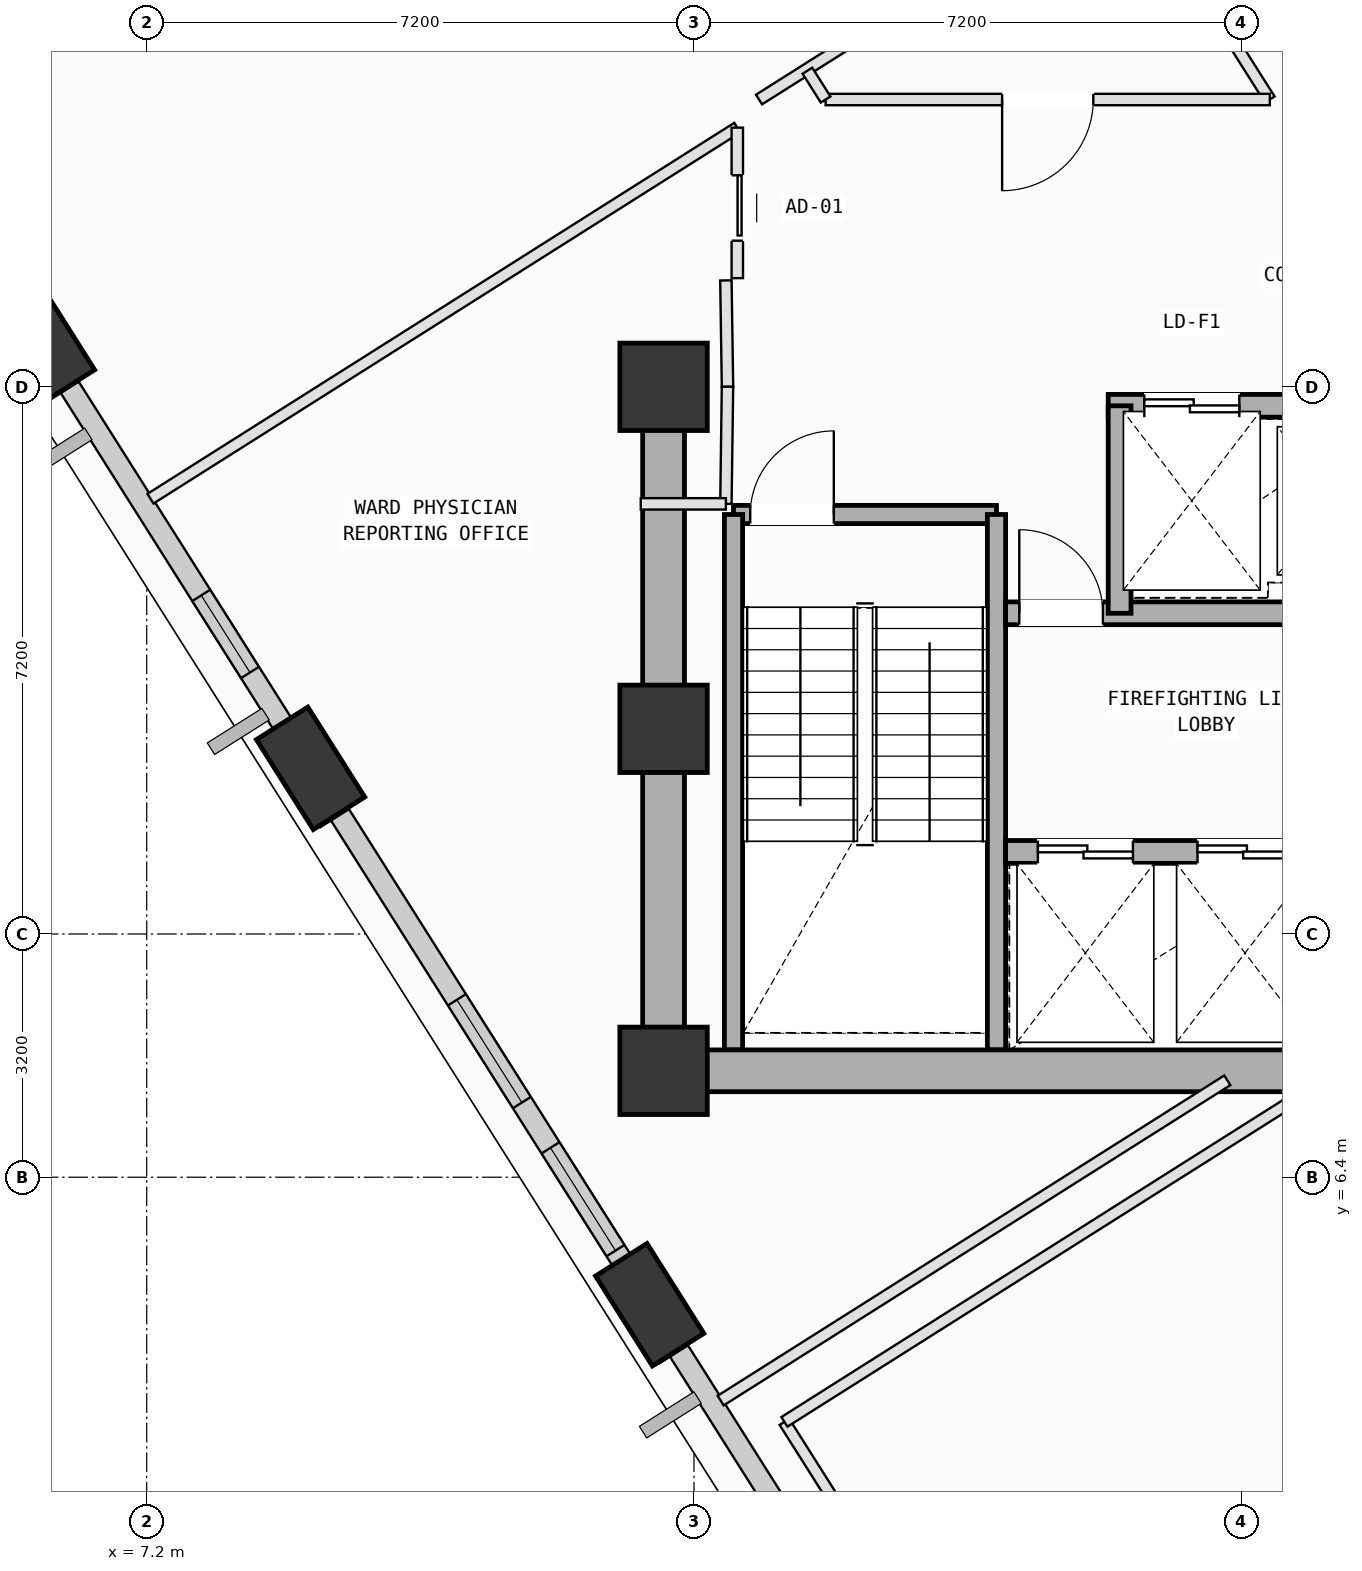
"""IFC4 building model, lengths in metres.
Left out: names, types, materials, properties, quantities, classifications, styles, units other than length and angle.
Written with IfcOpenShell. Run it as: python <this file> out.ifc"""

import sys

from ifc_helpers import new_model, si_unit, direction, frame, frame_2d, origin, origin_2d, place, context, subcontext, project, spatial, rectangle, extrude, element, fill, save


model = new_model("IFC4")
c1 = context("Model", 3, precision=1e-05, world=origin(), true_north=direction((0.0, 1.0)))
c2 = subcontext(c1, "Body", "Model", "MODEL_VIEW")
j1 = project(units=[si_unit("LENGTHUNIT", "METRE"), si_unit("PLANEANGLEUNIT", "RADIAN")], contexts=[c1])
p1 = place(None, origin())
s1 = spatial("IfcSite", under=j1, at=p1, CompositionType="ELEMENT")
p2 = place(p1, origin())
s2 = spatial("IfcBuilding", under=s1, at=p2, CompositionType="ELEMENT")
p3 = place(p2, frame((0.0, 0.0, 161.8)))
s3 = spatial("IfcBuildingStorey", under=s2, at=p3, CompositionType="ELEMENT", Elevation=161.8)
for number, where, z_axis, x_axis in (
    (1, (14.0, 7.8, 0.0), (0.0, 0.0, 1.0), (1.0, 0.0, 0.0)),
    (2, (14.0, 12.3, 0.0), (0.0, 0.0, 1.0), (1.0, 0.0, 0.0)),
    (3, (14.0, 16.8, 0.0), (0.0, 0.0, 1.0), (1.0, 0.0, 0.0)),
):
    element("IfcColumn", number, at=place(p3, frame(where, z_axis=z_axis, x_axis=x_axis)), inside=s3, PredefinedType="COLUMN", context=c2, shape_type="SweptSolid", body=[
        extrude(rectangle(XDim=1.15, YDim=1.15, at=origin_2d()), origin(), (0.0, 0.0, 1.0), 4.0),
    ])
p4 = place(p3, frame((5.802, 17.401, 0.002), z_axis=(0.031361950908, -0.114164780676, 0.992966681661), x_axis=(-0.737594296746, 0.667787272041, 0.100074036129)))
e4 = element("IfcColumn", 4, at=p4, inside=s3, PredefinedType="COLUMN", context=c2, shape_type="SweptSolid", body=[
    extrude(rectangle(XDim=1.4, YDim=0.8, at=origin_2d()), origin(), (0.0, 0.0, 1.0), 4.025),
])
p5 = place(p3, frame((9.356, 11.78, 0.002), z_axis=(0.054445838239, -0.099362137343, 0.993560675732), x_axis=(-0.872179225903, 0.479720383709, 0.095769261028)))
e5 = element("IfcColumn", 5, at=p5, inside=s3, PredefinedType="COLUMN", context=c2, shape_type="SweptSolid", body=[
    extrude(rectangle(XDim=1.4, YDim=0.8, at=origin_2d()), origin(), (0.0, 0.0, 1.0), 4.022),
])
p6 = place(p3, frame((13.818, 4.722, 0.002), z_axis=(0.083311503867, -0.080763009212, 0.99324545288), x_axis=(-0.974731905422, 0.200695041451, 0.098077586066)))
e6 = element("IfcColumn", 6, at=p6, inside=s3, PredefinedType="COLUMN", context=c2, shape_type="SweptSolid", body=[
    extrude(rectangle(XDim=1.4, YDim=0.8, at=origin_2d()), origin(), (0.0, 0.0, 1.0), 4.023),
])
p7 = place(p3, frame((9.212, 12.007, 0.0), z_axis=(0.0, 0.0, 1.0), x_axis=(-0.534348210739, 0.845264449554, 0.0)))
e7 = element("IfcWall", 7, at=p7, inside=s3, PredefinedType="SOLIDWALL", context=c2, shape_type="SweptSolid", body=[
    extrude(rectangle(XDim=5.662, YDim=0.28, at=frame_2d((2.831, 0.0))), origin(), (0.0, 0.0, 1.0), 3.165),
])
p8 = place(p7, frame((1.223, 0.0, 0.75)))
e8 = element("IfcOpeningElement", 8, at=p8, cuts=e7, PredefinedType="OPENING", context=c2, shape_type="SweptSolid", body=[
    extrude(rectangle(XDim=1.2, YDim=1.75, at=frame_2d((0.6, 0.875))), frame((0.0, 0.15, 0.0), z_axis=(0.0, -1.0, 0.0), x_axis=(1.0, 0.0, 0.0)), (0.0, 0.0, 1.0), 0.3),
])
p9 = place(p3, frame((13.675, 4.947, 0.0), z_axis=(0.0, 0.0, 1.0), x_axis=(-0.534359841205, 0.845257097047, 0.0)))
e9 = element("IfcWall", 9, at=p9, inside=s3, PredefinedType="SOLIDWALL", context=c2, shape_type="SweptSolid", body=[
    extrude(rectangle(XDim=7.36, YDim=0.28, at=frame_2d((3.68, 0.0))), origin(), (0.0, 0.0, 1.0), 3.165),
])
p10 = place(p9, frame((2.881, 0.0, 0.75)))
e10 = element("IfcOpeningElement", 10, at=p10, cuts=e9, PredefinedType="OPENING", context=c2, shape_type="SweptSolid", body=[
    extrude(rectangle(XDim=1.6, YDim=1.95, at=frame_2d((0.8, 0.975))), frame((0.0, 0.15, 0.0), z_axis=(0.0, -1.0, 0.0), x_axis=(1.0, 0.0, 0.0)), (0.0, 0.0, 1.0), 0.3),
])
p11 = place(p9, frame((0.576, 0.0, 0.75)))
e11 = element("IfcOpeningElement", 11, at=p11, cuts=e9, PredefinedType="OPENING", context=c2, shape_type="SweptSolid", body=[
    extrude(rectangle(XDim=1.6, YDim=1.95, at=frame_2d((0.8, 0.975))), frame((0.0, 0.15, 0.0), z_axis=(0.0, -1.0, 0.0), x_axis=(1.0, 0.0, 0.0)), (0.0, 0.0, 1.0), 0.3),
])
p12 = place(p3, frame((17.528, -1.147, 0.0), z_axis=(0.0, 0.0, 1.0), x_axis=(-0.534339793989, 0.845269770287, 0.0)))
e12 = element("IfcWall", 12, at=p12, inside=s3, PredefinedType="SOLIDWALL", context=c2, shape_type="SweptSolid", body=[
    extrude(rectangle(XDim=6.223, YDim=0.28, at=frame_2d((3.112, 0.0))), origin(), (0.0, 0.0, 1.0), 3.165),
])
p13 = place(p12, frame((1.588, 0.0, 0.75)))
e13 = element("IfcOpeningElement", 13, at=p13, cuts=e12, PredefinedType="OPENING", context=c2, shape_type="SweptSolid", body=[
    extrude(rectangle(XDim=2.0, YDim=1.95, at=frame_2d((1.0, 0.975))), frame((0.0, 0.15, 0.0), z_axis=(0.0, -1.0, 0.0), x_axis=(1.0, 0.0, 0.0)), (0.0, 0.0, 1.0), 0.3),
])
p14 = place(p3, frame((14.92, 15.12, 0.0), z_axis=(0.0, 0.0, 1.0), x_axis=(1.0, 0.0, 0.0)))
e14 = element("IfcWall", 14, at=p14, inside=s3, PredefinedType="SOLIDWALL", context=c2, shape_type="SweptSolid", body=[
    extrude(rectangle(XDim=3.46, YDim=0.24, at=frame_2d((1.73, 0.0))), origin(), (0.0, 0.0, 1.0), 3.78),
])
p15 = place(p14, frame((0.22, 0.0, 0.0)))
e15 = element("IfcOpeningElement", 15, at=p15, cuts=e14, PredefinedType="OPENING", context=c2, shape_type="SweptSolid", body=[
    extrude(rectangle(XDim=1.1, YDim=2.15, at=frame_2d((0.55, 1.075))), frame((0.0, 0.13, 0.0), z_axis=(0.0, -1.0, 0.0), x_axis=(1.0, 0.0, 0.0)), (0.0, 0.0, 1.0), 0.26),
])
for number, where, z_axis, x_axis in (
    (16, (18.38, 15.12, 0.0), (0.0, 0.0, 1.0), (0.0, -1.0, 0.0)),
    (17, (14.92, 8.075, 0.0), (0.0, 0.0, 1.0), (0.0, 1.0, 0.0)),
):
    element("IfcWall", number, at=place(p3, frame(where, z_axis=z_axis, x_axis=x_axis)), inside=s3, PredefinedType="SOLIDWALL", context=c2, shape_type="SweptSolid", body=[
        extrude(rectangle(XDim=7.045, YDim=0.24, at=frame_2d((3.522, 0.0))), origin(), (0.0, 0.0, 1.0), 3.78),
    ])
p16 = place(p3, frame((14.0, 7.8, 0.0), z_axis=(0.0, 0.0, 1.0), x_axis=(1.0, 0.0, 0.0)))
e18 = element("IfcWall", 18, at=p16, inside=s3, PredefinedType="SHEAR", context=c2, shape_type="SweptSolid", body=[
    extrude(rectangle(XDim=10.8, YDim=0.55, at=frame_2d((5.4, 0.0))), origin(), (0.0, 0.0, 1.0), 3.78),
])
p17 = place(p3, frame((14.0, 16.8, 0.0), z_axis=(0.0, 0.0, 1.0), x_axis=(0.0, -1.0, 0.0)))
e19 = element("IfcWall", 19, at=p17, inside=s3, PredefinedType="SHEAR", context=c2, shape_type="SweptSolid", body=[
    extrude(rectangle(XDim=9.0, YDim=0.55, at=frame_2d((4.5, 0.0))), origin(), (0.0, 0.0, 1.0), 3.78),
])
p18 = place(p3, frame((19.85, 16.55, 0.0), z_axis=(0.0, 0.0, 1.0), x_axis=(1.0, 0.0, 0.0)))
e20 = element("IfcWall", 20, at=p18, inside=s3, PredefinedType="SOLIDWALL", context=c2, shape_type="SweptSolid", body=[
    extrude(rectangle(XDim=4.375, YDim=0.3, at=frame_2d((2.188, 0.0))), origin(), (0.0, 0.0, 1.0), 3.78),
])
p19 = place(p18, frame((0.475, 0.0, 0.0)))
e21 = element("IfcOpeningElement", 21, at=p19, cuts=e20, PredefinedType="OPENING", context=c2, shape_type="SweptSolid", body=[
    extrude(rectangle(XDim=1.25, YDim=2.18, at=frame_2d((0.625, 1.09))), frame((0.0, 0.16, 0.0), z_axis=(0.0, -1.0, 0.0), x_axis=(1.0, 0.0, 0.0)), (0.0, 0.0, 1.0), 0.32),
])
p20 = place(p18, frame((2.49, 0.0, 0.0)))
e22 = element("IfcOpeningElement", 22, at=p20, cuts=e20, PredefinedType="OPENING", context=c2, shape_type="SweptSolid", body=[
    extrude(rectangle(XDim=1.02, YDim=2.12, at=frame_2d((0.51, 1.06))), frame((0.0, 0.16, 0.0), z_axis=(0.0, -1.0, 0.0), x_axis=(1.0, 0.0, 0.0)), (0.0, 0.0, 1.0), 0.32),
])
p21 = place(p3, frame((18.5, 10.68, 0.0), z_axis=(0.0, 0.0, 1.0), x_axis=(1.0, 0.0, 0.0)))
e23 = element("IfcWall", 23, at=p21, inside=s3, PredefinedType="SOLIDWALL", context=c2, shape_type="SweptSolid", body=[
    extrude(rectangle(XDim=5.3, YDim=0.3, at=frame_2d((2.65, 0.0))), origin(), (0.0, 0.0, 1.0), 3.78),
])
p22 = place(p21, frame((4.22, 0.0, 0.0)))
e24 = element("IfcOpeningElement", 24, at=p22, cuts=e23, PredefinedType="OPENING", context=c2, shape_type="SweptSolid", body=[
    extrude(rectangle(XDim=0.86, YDim=2.06, at=frame_2d((0.43, 1.03))), frame((0.0, 0.16, 0.0), z_axis=(0.0, -1.0, 0.0), x_axis=(1.0, 0.0, 0.0)), (0.0, 0.0, 1.0), 0.32),
])
p23 = place(p21, frame((0.425, 0.0, 0.0)))
e25 = element("IfcOpeningElement", 25, at=p23, cuts=e23, PredefinedType="OPENING", context=c2, shape_type="SweptSolid", body=[
    extrude(rectangle(XDim=1.25, YDim=2.18, at=frame_2d((0.625, 1.09))), frame((0.0, 0.16, 0.0), z_axis=(0.0, -1.0, 0.0), x_axis=(1.0, 0.0, 0.0)), (0.0, 0.0, 1.0), 0.32),
])
p24 = place(p21, frame((2.525, 0.0, 0.0)))
e26 = element("IfcOpeningElement", 26, at=p24, cuts=e23, PredefinedType="OPENING", context=c2, shape_type="SweptSolid", body=[
    extrude(rectangle(XDim=1.25, YDim=2.18, at=frame_2d((0.625, 1.09))), frame((0.0, 0.16, 0.0), z_axis=(0.0, -1.0, 0.0), x_axis=(1.0, 0.0, 0.0)), (0.0, 0.0, 1.0), 0.32),
])
p25 = place(p3, frame((18.5, 13.82, 0.0), z_axis=(0.0, 0.0, 1.0), x_axis=(1.0, 0.0, 0.0)))
e27 = element("IfcWall", 27, at=p25, inside=s3, PredefinedType="SOLIDWALL", context=c2, shape_type="SweptSolid", body=[
    extrude(rectangle(XDim=5.3, YDim=0.3, at=frame_2d((2.65, 0.0))), origin(), (0.0, 0.0, 1.0), 3.78),
])
p26 = place(p25, frame((0.18, 0.0, 0.0)))
e28 = element("IfcOpeningElement", 28, at=p26, cuts=e27, PredefinedType="OPENING", context=c2, shape_type="SweptSolid", body=[
    extrude(rectangle(XDim=1.1, YDim=2.15, at=frame_2d((0.55, 1.075))), frame((0.0, 0.16, 0.0), z_axis=(0.0, -1.0, 0.0), x_axis=(1.0, 0.0, 0.0)), (0.0, 0.0, 1.0), 0.32),
])
p27 = place(p3, frame((20.0, 13.82, 0.0), z_axis=(0.0, 0.0, 1.0), x_axis=(0.0, 1.0, 0.0)))
e29 = element("IfcWall", 29, at=p27, inside=s3, PredefinedType="SOLIDWALL", context=c2, shape_type="SweptSolid", body=[
    extrude(rectangle(XDim=2.73, YDim=0.3, at=frame_2d((1.365, 0.0))), origin(), (0.0, 0.0, 1.0), 3.78),
])
p28 = place(p3, frame((21.501, -6.169, 0.0), z_axis=(0.0, 0.0, 1.0), x_axis=(-0.534362466771, 0.845255437194, 0.0)))
e30 = element("IfcWall", 30, at=p28, inside=s3, PredefinedType="PARTITIONING", context=c2, shape_type="SweptSolid", body=[
    extrude(rectangle(XDim=11.062, YDim=0.15, at=frame_2d((5.531, 0.0))), origin(), (0.0, 0.0, 1.0), 3.165),
])
p29 = place(p3, frame((15.59, 3.181, 0.0), z_axis=(0.0, 0.0, 1.0), x_axis=(0.845257053827, 0.53435990957, 0.0)))
e31 = element("IfcWall", 31, at=p29, inside=s3, PredefinedType="PARTITIONING", context=c2, shape_type="SweptSolid", body=[
    extrude(rectangle(XDim=8.41, YDim=0.15, at=frame_2d((4.205, 0.0))), origin(), (0.0, 0.0, 1.0), 3.78),
])
p30 = place(p3, frame((14.82, 18.2, 0.0), z_axis=(0.0, 0.0, 1.0), x_axis=(0.01499656939, -0.99988754513, 0.0)))
e32 = element("IfcWall", 32, at=p30, inside=s3, PredefinedType="PARTITIONING", context=c2, shape_type="SweptSolid", body=[
    extrude(rectangle(XDim=1.4, YDim=0.15, at=frame_2d((0.7, 0.0))), origin(), (0.0, 0.0, 1.0), 3.78),
])
p31 = place(p3, frame((14.841, 16.8, 0.0), z_axis=(0.0, 0.0, 1.0), x_axis=(-0.01363221443, -0.999907077048, 0.0)))
e33 = element("IfcWall", 33, at=p31, inside=s3, PredefinedType="PARTITIONING", context=c2, shape_type="SweptSolid", body=[
    extrude(rectangle(XDim=1.54, YDim=0.15, at=frame_2d((0.77, 0.0))), origin(), (0.0, 0.0, 1.0), 3.78),
])
p32 = place(p3, frame((14.82, 15.26, 0.0), z_axis=(0.0, 0.0, 1.0), x_axis=(-1.0, 0.0, 0.0)))
e34 = element("IfcWall", 34, at=p32, inside=s3, PredefinedType="PARTITIONING", context=c2, shape_type="SweptSolid", body=[
    extrude(rectangle(XDim=1.12, YDim=0.15, at=frame_2d((0.56, 0.0))), origin(), (0.0, 0.0, 1.0), 3.78),
])
p33 = place(p3, frame((21.417, 7.675, 0.0), z_axis=(0.0, 0.0, 1.0), x_axis=(-0.845260047402, -0.534355174268, 0.0)))
e35 = element("IfcWall", 35, at=p33, inside=s3, PredefinedType="PARTITIONING", context=c2, shape_type="SweptSolid", body=[
    extrude(rectangle(XDim=7.886, YDim=0.15, at=frame_2d((3.943, 0.0))), origin(), (0.0, 0.0, 1.0), 3.78),
])
p34 = place(p3, frame((14.008, 3.991, 0.0), z_axis=(0.0, 0.0, 1.0), x_axis=(-0.534710294064, 0.845035443885, 0.0)))
e36 = element("IfcWall", 36, at=p34, inside=s3, PredefinedType="PARTITIONING", context=c2, shape_type="SweptSolid", body=[
    extrude(rectangle(XDim=0.986, YDim=0.15, at=frame_2d((0.493, 0.0))), origin(), (0.0, 0.0, 1.0), 3.165),
])
p35 = place(p3, frame((9.548, 11.046, 0.0), z_axis=(0.0, 0.0, 1.0), x_axis=(-0.534483823757, 0.845178704264, 0.0)))
e37 = element("IfcWall", 37, at=p35, inside=s3, PredefinedType="PARTITIONING", context=c2, shape_type="SweptSolid", body=[
    extrude(rectangle(XDim=0.992, YDim=0.15, at=frame_2d((0.496, 0.0))), origin(), (0.0, 0.0, 1.0), 3.165),
])
p36 = place(p3, frame((7.249, 15.328, 0.0), z_axis=(0.0, 0.0, 1.0), x_axis=(0.845207448996, 0.534438367038, 0.0)))
e38 = element("IfcWall", 38, at=p36, inside=s3, PredefinedType="PARTITIONING", context=c2, shape_type="SweptSolid", body=[
    extrude(rectangle(XDim=9.135, YDim=0.15, at=frame_2d((4.567, 0.0))), origin(), (0.0, 0.0, 1.0), 3.78),
])
p37 = place(p3, frame((14.97, 20.21, 0.0), z_axis=(0.0, 0.0, 1.0), x_axis=(0.0, -1.0, 0.0)))
e39 = element("IfcWall", 39, at=p37, inside=s3, PredefinedType="PARTITIONING", context=c2, shape_type="SweptSolid", body=[
    extrude(rectangle(XDim=1.98, YDim=0.15, at=frame_2d((0.99, 0.0))), origin(), (0.0, 0.0, 1.0), 3.78),
])
p38 = place(p37, frame((0.627, 0.0, 0.0)))
e40 = element("IfcOpeningElement", 40, at=p38, cuts=e39, PredefinedType="OPENING", context=c2, shape_type="SweptSolid", body=[
    extrude(rectangle(XDim=0.86, YDim=2.06, at=frame_2d((0.43, 1.03))), frame((0.0, 0.085, 0.0), z_axis=(0.0, -1.0, 0.0), x_axis=(1.0, 0.0, 0.0)), (0.0, 0.0, 1.0), 0.17),
])
p39 = place(p3, frame((5.992, 16.67, 0.0), z_axis=(0.0, 0.0, 1.0), x_axis=(-0.534011681052, 0.845477098744, 0.0)))
e41 = element("IfcWall", 41, at=p39, inside=s3, PredefinedType="PARTITIONING", context=c2, shape_type="SweptSolid", body=[
    extrude(rectangle(XDim=0.983, YDim=0.15, at=frame_2d((0.491, 0.0))), origin(), (0.0, 0.0, 1.0), 3.165),
])
p40 = place(p3, frame((19.998, 23.578, 0.0), z_axis=(0.0, 0.0, 1.0), x_axis=(-0.845256150615, -0.534361338279, 0.0)))
e42 = element("IfcWall", 42, at=p40, inside=s3, PredefinedType="PARTITIONING", context=c2, shape_type="SweptSolid", body=[
    extrude(rectangle(XDim=5.61, YDim=0.15, at=frame_2d((2.805, 0.0))), origin(), (0.0, 0.0, 1.0), 3.78),
])
p41 = place(p3, frame((20.057, 23.615, 0.0), z_axis=(0.0, 0.0, 1.0), x_axis=(0.534471261003, -0.845186648712, 0.0)))
e43 = element("IfcWall", 43, at=p41, inside=s3, PredefinedType="PARTITIONING", context=c2, shape_type="SweptSolid", body=[
    extrude(rectangle(XDim=3.591, YDim=0.15, at=frame_2d((1.795, 0.0))), origin(), (0.0, 0.0, 1.0), 3.78),
])
p42 = place(p3, frame((21.976, 20.58, 0.0), z_axis=(0.0, 0.0, 1.0), x_axis=(-1.0, 0.0, 0.0)))
e44 = element("IfcWall", 44, at=p42, inside=s3, PredefinedType="PARTITIONING", context=c2, shape_type="SweptSolid", body=[
    extrude(rectangle(XDim=5.844, YDim=0.15, at=frame_2d((2.922, 0.0))), origin(), (0.0, 0.0, 1.0), 3.78),
])
p43 = place(p42, frame((2.322, 0.0, 0.0)))
e45 = element("IfcOpeningElement", 45, at=p43, cuts=e44, PredefinedType="OPENING", context=c2, shape_type="SweptSolid", body=[
    extrude(rectangle(XDim=1.2, YDim=2.15, at=frame_2d((0.6, 1.075))), frame((0.0, 0.085, 0.0), z_axis=(0.0, -1.0, 0.0), x_axis=(1.0, 0.0, 0.0)), (0.0, 0.0, 1.0), 0.17),
])
p44 = place(p3, frame((16.132, 20.58, 0.0), z_axis=(0.0, 0.0, 1.0), x_axis=(-0.53352132423, 0.845786614101, 0.0)))
e46 = element("IfcWall", 46, at=p44, inside=s3, PredefinedType="PARTITIONING", context=c2, shape_type="SweptSolid", body=[
    extrude(rectangle(XDim=0.448, YDim=0.15, at=frame_2d((0.224, 0.0))), origin(), (0.0, 0.0, 1.0), 3.78),
])
p45 = place(p8, origin())
e47 = element("IfcWindow", 47, at=p45, inside=s3, PartitioningType="SINGLE_PANEL", PredefinedType="WINDOW", context=c2, shape_type="SweptSolid", body=[
    extrude(rectangle(XDim=1.2, YDim=1.75, at=frame_2d((0.6, 0.875))), frame((0.0, 0.03, 0.0), z_axis=(0.0, -1.0, 0.0), x_axis=(1.0, 0.0, 0.0)), (0.0, 0.0, 1.0), 0.06),
])
fill(e8, e47)
p46 = place(p10, origin())
e48 = element("IfcWindow", 48, at=p46, inside=s3, PartitioningType="SINGLE_PANEL", PredefinedType="WINDOW", context=c2, shape_type="SweptSolid", body=[
    extrude(rectangle(XDim=1.6, YDim=1.95, at=frame_2d((0.8, 0.975))), frame((0.0, 0.03, 0.0), z_axis=(0.0, -1.0, 0.0), x_axis=(1.0, 0.0, 0.0)), (0.0, 0.0, 1.0), 0.06),
])
fill(e10, e48)
p47 = place(p11, origin())
e49 = element("IfcWindow", 49, at=p47, inside=s3, PartitioningType="SINGLE_PANEL", PredefinedType="WINDOW", context=c2, shape_type="SweptSolid", body=[
    extrude(rectangle(XDim=1.6, YDim=1.95, at=frame_2d((0.8, 0.975))), frame((0.0, 0.03, 0.0), z_axis=(0.0, -1.0, 0.0), x_axis=(1.0, 0.0, 0.0)), (0.0, 0.0, 1.0), 0.06),
])
fill(e11, e49)
p48 = place(p15, origin())
e50 = element("IfcDoor", 50, at=p48, inside=s3, OperationType="SINGLE_SWING_RIGHT", PredefinedType="DOOR", context=c2, shape_type="SweptSolid", body=[
    extrude(rectangle(XDim=1.1, YDim=2.15, at=frame_2d((0.55, 1.075))), frame((0.0, 0.025, 0.0), z_axis=(0.0, -1.0, 0.0), x_axis=(1.0, 0.0, 0.0)), (0.0, 0.0, 1.0), 0.05),
])
fill(e15, e50)
p49 = place(p26, origin())
e51 = element("IfcDoor", 51, at=p49, inside=s3, OperationType="SINGLE_SWING_LEFT", PredefinedType="DOOR", context=c2, shape_type="SweptSolid", body=[
    extrude(rectangle(XDim=1.1, YDim=2.15, at=frame_2d((0.55, 1.075))), frame((0.0, 0.025, 0.0), z_axis=(0.0, -1.0, 0.0), x_axis=(1.0, 0.0, 0.0)), (0.0, 0.0, 1.0), 0.05),
])
fill(e28, e51)
p50 = place(p23, origin())
e52 = element("IfcDoor", 52, at=p50, inside=s3, OperationType="DOUBLE_DOOR_SLIDING", PredefinedType="DOOR", context=c2, shape_type="SweptSolid", body=[
    extrude(rectangle(XDim=1.25, YDim=2.18, at=frame_2d((0.625, 1.09))), frame((0.0, 0.025, 0.0), z_axis=(0.0, -1.0, 0.0), x_axis=(1.0, 0.0, 0.0)), (0.0, 0.0, 1.0), 0.05),
])
fill(e25, e52)
p51 = place(p24, origin())
e53 = element("IfcDoor", 53, at=p51, inside=s3, OperationType="DOUBLE_DOOR_SLIDING", PredefinedType="DOOR", context=c2, shape_type="SweptSolid", body=[
    extrude(rectangle(XDim=1.25, YDim=2.18, at=frame_2d((0.625, 1.09))), frame((0.0, 0.025, 0.0), z_axis=(0.0, -1.0, 0.0), x_axis=(1.0, 0.0, 0.0)), (0.0, 0.0, 1.0), 0.05),
])
fill(e26, e53)
p52 = place(p19, origin())
e54 = element("IfcDoor", 54, at=p52, inside=s3, OperationType="DOUBLE_DOOR_SLIDING", PredefinedType="DOOR", context=c2, shape_type="SweptSolid", body=[
    extrude(rectangle(XDim=1.25, YDim=2.18, at=frame_2d((0.625, 1.09))), frame((0.0, 0.025, 0.0), z_axis=(0.0, -1.0, 0.0), x_axis=(1.0, 0.0, 0.0)), (0.0, 0.0, 1.0), 0.05),
])
fill(e21, e54)
p53 = place(p38, origin())
e55 = element("IfcDoor", 55, at=p53, inside=s3, OperationType="SLIDING_TO_LEFT", PredefinedType="DOOR", context=c2, shape_type="SweptSolid", body=[
    extrude(rectangle(XDim=0.86, YDim=2.06, at=frame_2d((0.43, 1.03))), frame((0.0, 0.025, 0.0), z_axis=(0.0, -1.0, 0.0), x_axis=(1.0, 0.0, 0.0)), (0.0, 0.0, 1.0), 0.05),
])
fill(e40, e55)
p54 = place(p43, origin())
e56 = element("IfcDoor", 56, at=p54, inside=s3, OperationType="SINGLE_SWING_RIGHT", PredefinedType="DOOR", context=c2, shape_type="SweptSolid", body=[
    extrude(rectangle(XDim=1.2, YDim=2.15, at=frame_2d((0.6, 1.075))), frame((0.0, 0.025, 0.0), z_axis=(0.0, -1.0, 0.0), x_axis=(1.0, 0.0, 0.0)), (0.0, 0.0, 1.0), 0.05),
])
fill(e45, e56)
save(model, sys.argv[1])
